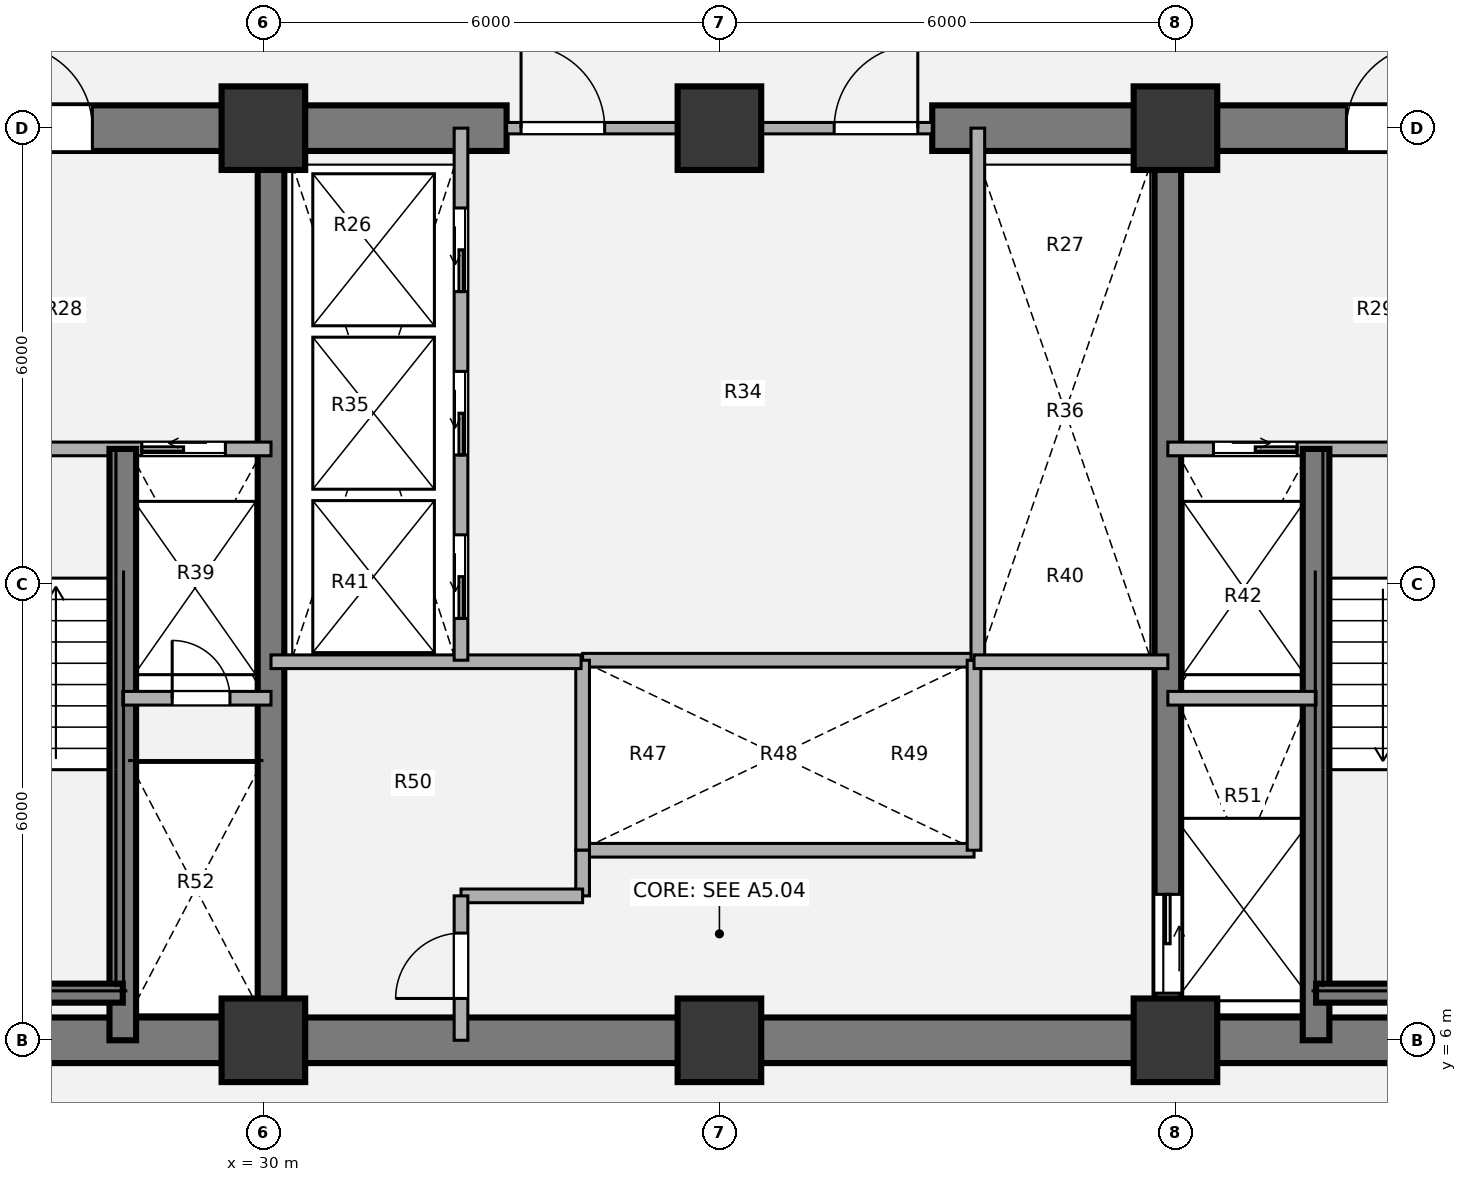
"""IFC4 building model, lengths in metres.
Left out: names, types, materials, properties, quantities, classifications, styles, units other than length and angle.
Written with IfcOpenShell. Run it as: python <this file> out.ifc"""

import sys

from ifc_helpers import new_model, si_unit, direction, frame, frame_2d, origin, origin_2d, place, context, subcontext, project, spatial, rectangle, extrude, source, transform, mapped, element, fill, save


model = new_model("IFC4")
c1 = context("Model", 3, precision=1e-05, world=origin(), true_north=direction((0.0, 1.0)))
c2 = subcontext(c1, "Body", "Model", "MODEL_VIEW")
j1 = project(units=[si_unit("LENGTHUNIT", "METRE"), si_unit("PLANEANGLEUNIT", "RADIAN")], contexts=[c1])
p1 = place(None, origin())
s1 = spatial("IfcSite", under=j1, at=p1, CompositionType="ELEMENT")
p2 = place(p1, origin())
s2 = spatial("IfcBuilding", under=s1, at=p2, CompositionType="ELEMENT")
p3 = place(p2, frame((0.0, 0.0, 30.78)))
s3 = spatial("IfcBuildingStorey", under=s2, at=p3, CompositionType="ELEMENT", Elevation=30.78)
m1 = source(origin(), c2, "Body", "SweptSolid", [
    extrude(rectangle(XDim=1.1, YDim=1.1, at=origin_2d()), origin(), (0.0, 0.0, 1.0), 3.78),
])
for number, where, z_axis, x_axis in (
    (1, (30.0, 6.0, 0.0), (0.0, 0.0, 1.0), (1.0, 0.0, 0.0)),
    (2, (36.0, 6.0, 0.0), (0.0, 0.0, 1.0), (1.0, 0.0, 0.0)),
    (3, (42.0, 6.0, 0.0), (0.0, 0.0, 1.0), (1.0, 0.0, 0.0)),
    (4, (30.0, 18.0, 0.0), (0.0, 0.0, 1.0), (1.0, 0.0, 0.0)),
    (5, (36.0, 18.0, 0.0), (0.0, 0.0, 1.0), (1.0, 0.0, 0.0)),
    (6, (42.0, 18.0, 0.0), (0.0, 0.0, 1.0), (1.0, 0.0, 0.0)),
):
    element("IfcColumn", number, at=place(p3, frame(where, z_axis=z_axis, x_axis=x_axis)), inside=s3, PredefinedType="COLUMN", context=c2, shape_type="MappedRepresentation", body=[
        mapped(m1, transform((0.0, 0.0, 0.0), x_axis=(1.0, 0.0, 0.0), y_axis=(0.0, 1.0, 0.0), z_axis=(0.0, 0.0, 1.0), scale=1.0)),
    ])
p4 = place(p3, frame((48.3, 6.0, 0.0), z_axis=(0.0, 0.0, 1.0), x_axis=(-1.0, 0.0, 0.0)))
e7 = element("IfcWall", 7, at=p4, inside=s3, PredefinedType="SHEAR", context=c2, shape_type="SweptSolid", body=[
    extrude(rectangle(XDim=24.6, YDim=0.6, at=frame_2d((12.3, 0.0))), origin(), (0.0, 0.0, 1.0), 3.78),
])
p5 = place(p3, frame((23.7, 18.0, 0.0), z_axis=(0.0, 0.0, 1.0), x_axis=(1.0, 0.0, 0.0)))
e8 = element("IfcWall", 8, at=p5, inside=s3, PredefinedType="SHEAR", context=c2, shape_type="SweptSolid", body=[
    extrude(rectangle(XDim=9.5, YDim=0.6, at=frame_2d((4.75, 0.0))), origin(), (0.0, 0.0, 1.0), 3.78),
])
p6 = place(p5, frame((2.95, 0.0, 0.0)))
e9 = element("IfcOpeningElement", 9, at=p6, cuts=e8, PredefinedType="OPENING", context=c2, shape_type="SweptSolid", body=[
    extrude(rectangle(XDim=1.1, YDim=2.1, at=origin_2d()), frame((0.55, 0.31, 1.05), z_axis=(0.0, -1.0, 0.0), x_axis=(1.0, 0.0, 0.0)), (0.0, 0.0, 1.0), 0.62),
])
p7 = place(p3, frame((38.8, 18.0, 0.0), z_axis=(0.0, 0.0, 1.0), x_axis=(1.0, 0.0, 0.0)))
e10 = element("IfcWall", 10, at=p7, inside=s3, PredefinedType="SHEAR", context=c2, shape_type="SweptSolid", body=[
    extrude(rectangle(XDim=9.5, YDim=0.6, at=frame_2d((4.75, 0.0))), origin(), (0.0, 0.0, 1.0), 3.78),
])
p8 = place(p7, frame((5.45, 0.0, 0.0)))
e11 = element("IfcOpeningElement", 11, at=p8, cuts=e10, PredefinedType="OPENING", context=c2, shape_type="SweptSolid", body=[
    extrude(rectangle(XDim=1.1, YDim=2.1, at=origin_2d()), frame((0.55, 0.31, 1.05), z_axis=(0.0, -1.0, 0.0), x_axis=(1.0, 0.0, 0.0)), (0.0, 0.0, 1.0), 0.62),
])
p9 = place(p3, frame((30.1, 6.0, 0.0), z_axis=(0.0, 0.0, 1.0), x_axis=(0.0, 1.0, 0.0)))
e12 = element("IfcWall", 12, at=p9, inside=s3, PredefinedType="SHEAR", context=c2, shape_type="SweptSolid", body=[
    extrude(rectangle(XDim=12.0, YDim=0.35, at=frame_2d((6.0, 0.0))), origin(), (0.0, 0.0, 1.0), 3.78),
])
p10 = place(p3, frame((41.9, 18.0, 0.0), z_axis=(0.0, 0.0, 1.0), x_axis=(0.0, -1.0, 0.0)))
e13 = element("IfcWall", 13, at=p10, inside=s3, PredefinedType="SHEAR", context=c2, shape_type="SweptSolid", body=[
    extrude(rectangle(XDim=12.0, YDim=0.35, at=frame_2d((6.0, 0.0))), origin(), (0.0, 0.0, 1.0), 3.78),
])
p11 = place(p10, frame((10.08, 0.0, 0.0)))
e14 = element("IfcOpeningElement", 14, at=p11, cuts=e13, PredefinedType="OPENING", context=c2, shape_type="SweptSolid", body=[
    extrude(rectangle(XDim=1.3, YDim=2.1, at=origin_2d()), frame((0.65, 0.185, 1.05), z_axis=(0.0, -1.0, 0.0), x_axis=(1.0, 0.0, 0.0)), (0.0, 0.0, 1.0), 0.37),
])
for number, where, z_axis, x_axis in (
    (15, (34.2, 11.0, 0.0), (0.0, 0.0, 1.0), (1.0, 0.0, 0.0)),
    (16, (34.2, 8.5, 0.0), (0.0, 0.0, 1.0), (1.0, 0.0, 0.0)),
):
    element("IfcWall", number, at=place(p3, frame(where, z_axis=z_axis, x_axis=x_axis)), inside=s3, PredefinedType="PARTITIONING", context=c2, shape_type="SweptSolid", body=[
        extrude(rectangle(XDim=5.15, YDim=0.18, at=frame_2d((2.575, 0.0))), origin(), (0.0, 0.0, 1.0), 3.5),
    ])
for number, where, z_axis, x_axis in (
    (17, (34.2, 8.5, 0.0), (0.0, 0.0, 1.0), (0.0, 1.0, 0.0)),
    (18, (39.35, 8.5, 0.0), (0.0, 0.0, 1.0), (0.0, 1.0, 0.0)),
):
    element("IfcWall", number, at=place(p3, frame(where, z_axis=z_axis, x_axis=x_axis)), inside=s3, PredefinedType="PARTITIONING", context=c2, shape_type="SweptSolid", body=[
        extrude(rectangle(XDim=2.5, YDim=0.18, at=frame_2d((1.25, 0.0))), origin(), (0.0, 0.0, 1.0), 3.5),
    ])
p12 = place(p3, frame((39.4, 11.0, 0.0), z_axis=(0.0, 0.0, 1.0), x_axis=(0.0, 1.0, 0.0)))
e19 = element("IfcWall", 19, at=p12, inside=s3, PredefinedType="PARTITIONING", context=c2, shape_type="SweptSolid", body=[
    extrude(rectangle(XDim=7.0, YDim=0.18, at=frame_2d((3.5, 0.0))), origin(), (0.0, 0.0, 1.0), 3.5),
])
p13 = place(p3, frame((30.1, 10.98, 0.0), z_axis=(0.0, 0.0, 1.0), x_axis=(1.0, 0.0, 0.0)))
e20 = element("IfcWall", 20, at=p13, inside=s3, PredefinedType="PARTITIONING", context=c2, shape_type="SweptSolid", body=[
    extrude(rectangle(XDim=4.08, YDim=0.18, at=frame_2d((2.04, 0.0))), origin(), (0.0, 0.0, 1.0), 3.5),
])
p14 = place(p3, frame((34.2, 7.9, 0.0), z_axis=(0.0, 0.0, 1.0), x_axis=(0.0, 1.0, 0.0)))
e21 = element("IfcWall", 21, at=p14, inside=s3, PredefinedType="PARTITIONING", context=c2, shape_type="SweptSolid", body=[
    extrude(rectangle(XDim=0.6, YDim=0.18, at=frame_2d((0.3, 0.0))), origin(), (0.0, 0.0, 1.0), 3.5),
])
p15 = place(p3, frame((32.6, 7.9, 0.0), z_axis=(0.0, 0.0, 1.0), x_axis=(1.0, 0.0, 0.0)))
e22 = element("IfcWall", 22, at=p15, inside=s3, PredefinedType="PARTITIONING", context=c2, shape_type="SweptSolid", body=[
    extrude(rectangle(XDim=1.6, YDim=0.18, at=frame_2d((0.8, 0.0))), origin(), (0.0, 0.0, 1.0), 3.5),
])
p16 = place(p3, frame((32.6, 6.0, 0.0), z_axis=(0.0, 0.0, 1.0), x_axis=(0.0, 1.0, 0.0)))
e23 = element("IfcWall", 23, at=p16, inside=s3, PredefinedType="PARTITIONING", context=c2, shape_type="SweptSolid", body=[
    extrude(rectangle(XDim=1.9, YDim=0.18, at=frame_2d((0.95, 0.0))), origin(), (0.0, 0.0, 1.0), 3.5),
])
p17 = place(p16, frame((0.55, 0.0, 0.0)))
e24 = element("IfcOpeningElement", 24, at=p17, cuts=e23, PredefinedType="OPENING", context=c2, shape_type="SweptSolid", body=[
    extrude(rectangle(XDim=0.86, YDim=2.1, at=origin_2d()), frame((0.43, 0.1, 1.05), z_axis=(0.0, -1.0, 0.0), x_axis=(1.0, 0.0, 0.0)), (0.0, 0.0, 1.0), 0.2),
])
p18 = place(p3, frame((39.35, 10.98, 0.0), z_axis=(0.0, 0.0, 1.0), x_axis=(1.0, 0.0, 0.0)))
e25 = element("IfcWall", 25, at=p18, inside=s3, PredefinedType="PARTITIONING", context=c2, shape_type="SweptSolid", body=[
    extrude(rectangle(XDim=2.55, YDim=0.18, at=frame_2d((1.275, 0.0))), origin(), (0.0, 0.0, 1.0), 3.5),
])
p19 = place(p3, frame((33.2, 18.0, 0.0), z_axis=(0.0, 0.0, 1.0), x_axis=(1.0, 0.0, 0.0)))
e26 = element("IfcWall", 26, at=p19, inside=s3, PredefinedType="PARTITIONING", context=c2, shape_type="SweptSolid", body=[
    extrude(rectangle(XDim=5.6, YDim=0.15, at=frame_2d((2.8, 0.0))), origin(), (0.0, 0.0, 1.0), 2.315),
])
p20 = place(p19, frame((0.19, 0.0, 0.0)))
e27 = element("IfcOpeningElement", 27, at=p20, cuts=e26, PredefinedType="OPENING", context=c2, shape_type="SweptSolid", body=[
    extrude(rectangle(XDim=1.1, YDim=2.1, at=origin_2d()), frame((0.55, 0.085, 1.05), z_axis=(0.0, -1.0, 0.0), x_axis=(1.0, 0.0, 0.0)), (0.0, 0.0, 1.0), 0.17),
])
p21 = place(p19, frame((4.31, 0.0, 0.0)))
e28 = element("IfcOpeningElement", 28, at=p21, cuts=e26, PredefinedType="OPENING", context=c2, shape_type="SweptSolid", body=[
    extrude(rectangle(XDim=1.1, YDim=2.1, at=origin_2d()), frame((0.55, 0.085, 1.05), z_axis=(0.0, -1.0, 0.0), x_axis=(1.0, 0.0, 0.0)), (0.0, 0.0, 1.0), 0.17),
])
p22 = place(p3, frame((24.0, 13.78, 0.0), z_axis=(0.0, 0.0, 1.0), x_axis=(1.0, 0.0, 0.0)))
e29 = element("IfcWall", 29, at=p22, inside=s3, PredefinedType="PARTITIONING", context=c2, shape_type="SweptSolid", body=[
    extrude(rectangle(XDim=6.1, YDim=0.18, at=frame_2d((3.05, 0.0))), origin(), (0.0, 0.0, 1.0), 3.5),
])
p23 = place(p22, frame((1.15, 0.0, 0.0)))
e30 = element("IfcOpeningElement", 30, at=p23, cuts=e29, PredefinedType="OPENING", context=c2, shape_type="SweptSolid", body=[
    extrude(rectangle(XDim=1.1, YDim=2.1, at=origin_2d()), frame((0.55, 0.1, 1.05), z_axis=(0.0, -1.0, 0.0), x_axis=(1.0, 0.0, 0.0)), (0.0, 0.0, 1.0), 0.2),
])
p24 = place(p22, frame((4.4, 0.0, 0.0)))
e31 = element("IfcOpeningElement", 31, at=p24, cuts=e29, PredefinedType="OPENING", context=c2, shape_type="SweptSolid", body=[
    extrude(rectangle(XDim=1.1, YDim=2.1, at=origin_2d()), frame((0.55, 0.1, 1.05), z_axis=(0.0, -1.0, 0.0), x_axis=(1.0, 0.0, 0.0)), (0.0, 0.0, 1.0), 0.2),
])
p25 = place(p3, frame((28.15, 6.0, 0.0), z_axis=(0.0, 0.0, 1.0), x_axis=(0.0, 1.0, 0.0)))
e32 = element("IfcWall", 32, at=p25, inside=s3, PredefinedType="SHEAR", context=c2, shape_type="SweptSolid", body=[
    extrude(rectangle(XDim=7.78, YDim=0.35, at=frame_2d((3.89, 0.0))), origin(), (0.0, 0.0, 1.0), 3.85),
])
p26 = place(p3, frame((24.58, 6.62, 0.0), z_axis=(0.0, 0.0, 1.0), x_axis=(1.0, 0.0, 0.0)))
e33 = element("IfcWall", 33, at=p26, inside=s3, PredefinedType="SHEAR", context=c2, shape_type="SweptSolid", body=[
    extrude(rectangle(XDim=3.57, YDim=0.25, at=frame_2d((1.785, 0.0))), origin(), (0.0, 0.0, 1.0), 3.85),
])
p27 = place(p3, frame((28.15, 10.5, 0.0), z_axis=(0.0, 0.0, 1.0), x_axis=(1.0, 0.0, 0.0)))
e34 = element("IfcWall", 34, at=p27, inside=s3, PredefinedType="PARTITIONING", context=c2, shape_type="SweptSolid", body=[
    extrude(rectangle(XDim=1.95, YDim=0.18, at=frame_2d((0.975, 0.0))), origin(), (0.0, 0.0, 1.0), 3.5),
])
p28 = place(p27, frame((0.65, 0.0, 0.0)))
e35 = element("IfcOpeningElement", 35, at=p28, cuts=e34, PredefinedType="OPENING", context=c2, shape_type="SweptSolid", body=[
    extrude(rectangle(XDim=0.76, YDim=2.05, at=origin_2d()), frame((0.38, 0.1, 1.025), z_axis=(0.0, -1.0, 0.0), x_axis=(1.0, 0.0, 0.0)), (0.0, 0.0, 1.0), 0.2),
])
p29 = place(p3, frame((41.9, 13.78, 0.0), z_axis=(0.0, 0.0, 1.0), x_axis=(1.0, 0.0, 0.0)))
e36 = element("IfcWall", 36, at=p29, inside=s3, PredefinedType="PARTITIONING", context=c2, shape_type="SweptSolid", body=[
    extrude(rectangle(XDim=6.1, YDim=0.18, at=frame_2d((3.05, 0.0))), origin(), (0.0, 0.0, 1.0), 3.5),
])
p30 = place(p29, frame((0.6, 0.0, 0.0)))
e37 = element("IfcOpeningElement", 37, at=p30, cuts=e36, PredefinedType="OPENING", context=c2, shape_type="SweptSolid", body=[
    extrude(rectangle(XDim=1.1, YDim=2.1, at=origin_2d()), frame((0.55, 0.1, 1.05), z_axis=(0.0, -1.0, 0.0), x_axis=(1.0, 0.0, 0.0)), (0.0, 0.0, 1.0), 0.2),
])
p31 = place(p29, frame((3.8, 0.0, 0.0)))
e38 = element("IfcOpeningElement", 38, at=p31, cuts=e36, PredefinedType="OPENING", context=c2, shape_type="SweptSolid", body=[
    extrude(rectangle(XDim=1.1, YDim=2.1, at=origin_2d()), frame((0.55, 0.1, 1.05), z_axis=(0.0, -1.0, 0.0), x_axis=(1.0, 0.0, 0.0)), (0.0, 0.0, 1.0), 0.2),
])
p32 = place(p3, frame((43.85, 6.0, 0.0), z_axis=(0.0, 0.0, 1.0), x_axis=(0.0, 1.0, 0.0)))
e39 = element("IfcWall", 39, at=p32, inside=s3, PredefinedType="SHEAR", context=c2, shape_type="SweptSolid", body=[
    extrude(rectangle(XDim=7.78, YDim=0.35, at=frame_2d((3.89, 0.0))), origin(), (0.0, 0.0, 1.0), 3.85),
])
p33 = place(p3, frame((43.85, 6.62, 0.0), z_axis=(0.0, 0.0, 1.0), x_axis=(1.0, 0.0, 0.0)))
e40 = element("IfcWall", 40, at=p33, inside=s3, PredefinedType="SHEAR", context=c2, shape_type="SweptSolid", body=[
    extrude(rectangle(XDim=3.57, YDim=0.25, at=frame_2d((1.785, 0.0))), origin(), (0.0, 0.0, 1.0), 3.85),
])
p34 = place(p3, frame((41.9, 10.5, 0.0), z_axis=(0.0, 0.0, 1.0), x_axis=(1.0, 0.0, 0.0)))
e41 = element("IfcWall", 41, at=p34, inside=s3, PredefinedType="PARTITIONING", context=c2, shape_type="SweptSolid", body=[
    extrude(rectangle(XDim=1.95, YDim=0.18, at=frame_2d((0.975, 0.0))), origin(), (0.0, 0.0, 1.0), 3.5),
])
p35 = place(p3, frame((32.6, 11.0, 0.0), z_axis=(0.0, 0.0, 1.0), x_axis=(0.0, 1.0, 0.0)))
e42 = element("IfcWall", 42, at=p35, inside=s3, PredefinedType="PARTITIONING", context=c2, shape_type="SweptSolid", body=[
    extrude(rectangle(XDim=7.0, YDim=0.18, at=frame_2d((3.5, 0.0))), origin(), (0.0, 0.0, 1.0), 3.5),
])
p36 = place(p35, frame((0.55, 0.0, 0.0)))
e43 = element("IfcOpeningElement", 43, at=p36, cuts=e42, PredefinedType="OPENING", context=c2, shape_type="SweptSolid", body=[
    extrude(rectangle(XDim=1.1, YDim=2.1, at=origin_2d()), frame((0.55, 0.1, 1.05), z_axis=(0.0, -1.0, 0.0), x_axis=(1.0, 0.0, 0.0)), (0.0, 0.0, 1.0), 0.2),
])
p37 = place(p35, frame((2.7, 0.0, 0.0)))
e44 = element("IfcOpeningElement", 44, at=p37, cuts=e42, PredefinedType="OPENING", context=c2, shape_type="SweptSolid", body=[
    extrude(rectangle(XDim=1.1, YDim=2.1, at=origin_2d()), frame((0.55, 0.1, 1.05), z_axis=(0.0, -1.0, 0.0), x_axis=(1.0, 0.0, 0.0)), (0.0, 0.0, 1.0), 0.2),
])
p38 = place(p35, frame((4.85, 0.0, 0.0)))
e45 = element("IfcOpeningElement", 45, at=p38, cuts=e42, PredefinedType="OPENING", context=c2, shape_type="SweptSolid", body=[
    extrude(rectangle(XDim=1.1, YDim=2.1, at=origin_2d()), frame((0.55, 0.1, 1.05), z_axis=(0.0, -1.0, 0.0), x_axis=(1.0, 0.0, 0.0)), (0.0, 0.0, 1.0), 0.2),
])
m2 = source(origin(), c2, "Body", "SweptSolid", [
    extrude(rectangle(XDim=0.86, YDim=2.1, at=origin_2d()), frame((0.43, 0.025, 1.05), z_axis=(0.0, -1.0, 0.0), x_axis=(1.0, 0.0, 0.0)), (0.0, 0.0, 1.0), 0.05),
])
p39 = place(p17, origin())
e46 = element("IfcDoor", 46, at=p39, inside=s3, OperationType="SINGLE_SWING_LEFT", PredefinedType="DOOR", context=c2, shape_type="MappedRepresentation", body=[
    mapped(m2, transform((0.0, 0.0, 0.0), x_axis=(1.0, 0.0, 0.0), y_axis=(0.0, 1.0, 0.0), z_axis=(0.0, 0.0, 1.0), scale=1.0)),
])
fill(e24, e46)
m3 = source(origin(), c2, "Body", "SweptSolid", [
    extrude(rectangle(XDim=1.1, YDim=2.1, at=origin_2d()), frame((0.55, 0.025, 1.05), z_axis=(0.0, -1.0, 0.0), x_axis=(1.0, 0.0, 0.0)), (0.0, 0.0, 1.0), 0.05),
])
p40 = place(p20, origin())
e47 = element("IfcDoor", 47, at=p40, inside=s3, OperationType="SINGLE_SWING_LEFT", PredefinedType="DOOR", context=c2, shape_type="MappedRepresentation", body=[
    mapped(m3, transform((0.0, 0.0, 0.0), x_axis=(1.0, 0.0, 0.0), y_axis=(0.0, 1.0, 0.0), z_axis=(0.0, 0.0, 1.0), scale=1.0)),
])
fill(e27, e47)
p41 = place(p21, origin())
e48 = element("IfcDoor", 48, at=p41, inside=s3, OperationType="SINGLE_SWING_RIGHT", PredefinedType="DOOR", context=c2, shape_type="MappedRepresentation", body=[
    mapped(m3, transform((0.0, 0.0, 0.0), x_axis=(1.0, 0.0, 0.0), y_axis=(0.0, 1.0, 0.0), z_axis=(0.0, 0.0, 1.0), scale=1.0)),
])
fill(e28, e48)
m4 = source(origin(), c2, "Body", "SweptSolid", [
    extrude(rectangle(XDim=1.1, YDim=2.1, at=origin_2d()), frame((0.55, 0.025, 1.05), z_axis=(0.0, -1.0, 0.0), x_axis=(1.0, 0.0, 0.0)), (0.0, 0.0, 1.0), 0.05),
])
p42 = place(p24, origin())
e49 = element("IfcDoor", 49, at=p42, inside=s3, OperationType="SLIDING_TO_LEFT", PredefinedType="DOOR", context=c2, shape_type="MappedRepresentation", body=[
    mapped(m4, transform((0.0, 0.0, 0.0), x_axis=(1.0, 0.0, 0.0), y_axis=(0.0, 1.0, 0.0), z_axis=(0.0, 0.0, 1.0), scale=1.0)),
])
fill(e31, e49)
m5 = source(origin(), c2, "Body", "SweptSolid", [
    extrude(rectangle(XDim=0.76, YDim=2.05, at=origin_2d()), frame((0.38, 0.025, 1.025), z_axis=(0.0, -1.0, 0.0), x_axis=(1.0, 0.0, 0.0)), (0.0, 0.0, 1.0), 0.05),
])
p43 = place(p28, origin())
e50 = element("IfcDoor", 50, at=p43, inside=s3, OperationType="SINGLE_SWING_LEFT", PredefinedType="DOOR", context=c2, shape_type="MappedRepresentation", body=[
    mapped(m5, transform((0.0, 0.0, 0.0), x_axis=(1.0, 0.0, 0.0), y_axis=(0.0, 1.0, 0.0), z_axis=(0.0, 0.0, 1.0), scale=1.0)),
])
fill(e35, e50)
p44 = place(p30, origin())
e51 = element("IfcDoor", 51, at=p44, inside=s3, OperationType="SLIDING_TO_RIGHT", PredefinedType="DOOR", context=c2, shape_type="MappedRepresentation", body=[
    mapped(m4, transform((0.0, 0.0, 0.0), x_axis=(1.0, 0.0, 0.0), y_axis=(0.0, 1.0, 0.0), z_axis=(0.0, 0.0, 1.0), scale=1.0)),
])
fill(e37, e51)
m6 = source(origin(), c2, "Body", "SweptSolid", [
    extrude(rectangle(XDim=1.3, YDim=2.1, at=origin_2d()), frame((0.65, 0.025, 1.05), z_axis=(0.0, -1.0, 0.0), x_axis=(1.0, 0.0, 0.0)), (0.0, 0.0, 1.0), 0.05),
])
p45 = place(p11, origin())
e52 = element("IfcDoor", 52, at=p45, inside=s3, OperationType="SLIDING_TO_LEFT", PredefinedType="DOOR", context=c2, shape_type="MappedRepresentation", body=[
    mapped(m6, transform((0.0, 0.0, 0.0), x_axis=(1.0, 0.0, 0.0), y_axis=(0.0, 1.0, 0.0), z_axis=(0.0, 0.0, 1.0), scale=1.0)),
])
fill(e14, e52)
p46 = place(p6, origin())
e53 = element("IfcDoor", 53, at=p46, inside=s3, OperationType="SINGLE_SWING_LEFT", PredefinedType="DOOR", context=c2, shape_type="MappedRepresentation", body=[
    mapped(m3, transform((0.0, 0.0, 0.0), x_axis=(1.0, 0.0, 0.0), y_axis=(0.0, 1.0, 0.0), z_axis=(0.0, 0.0, 1.0), scale=1.0)),
])
fill(e9, e53)
p47 = place(p8, origin())
e54 = element("IfcDoor", 54, at=p47, inside=s3, OperationType="SINGLE_SWING_RIGHT", PredefinedType="DOOR", context=c2, shape_type="MappedRepresentation", body=[
    mapped(m3, transform((0.0, 0.0, 0.0), x_axis=(1.0, 0.0, 0.0), y_axis=(0.0, 1.0, 0.0), z_axis=(0.0, 0.0, 1.0), scale=1.0)),
])
fill(e11, e54)
p48 = place(p36, origin())
e55 = element("IfcDoor", 55, at=p48, inside=s3, OperationType="SLIDING_TO_LEFT", PredefinedType="DOOR", context=c2, shape_type="MappedRepresentation", body=[
    mapped(m4, transform((0.0, 0.0, 0.0), x_axis=(1.0, 0.0, 0.0), y_axis=(0.0, 1.0, 0.0), z_axis=(0.0, 0.0, 1.0), scale=1.0)),
])
fill(e43, e55)
p49 = place(p37, origin())
e56 = element("IfcDoor", 56, at=p49, inside=s3, OperationType="SLIDING_TO_LEFT", PredefinedType="DOOR", context=c2, shape_type="MappedRepresentation", body=[
    mapped(m4, transform((0.0, 0.0, 0.0), x_axis=(1.0, 0.0, 0.0), y_axis=(0.0, 1.0, 0.0), z_axis=(0.0, 0.0, 1.0), scale=1.0)),
])
fill(e44, e56)
p50 = place(p38, origin())
e57 = element("IfcDoor", 57, at=p50, inside=s3, OperationType="SLIDING_TO_LEFT", PredefinedType="DOOR", context=c2, shape_type="MappedRepresentation", body=[
    mapped(m4, transform((0.0, 0.0, 0.0), x_axis=(1.0, 0.0, 0.0), y_axis=(0.0, 1.0, 0.0), z_axis=(0.0, 0.0, 1.0), scale=1.0)),
])
fill(e45, e57)
save(model, sys.argv[1])
